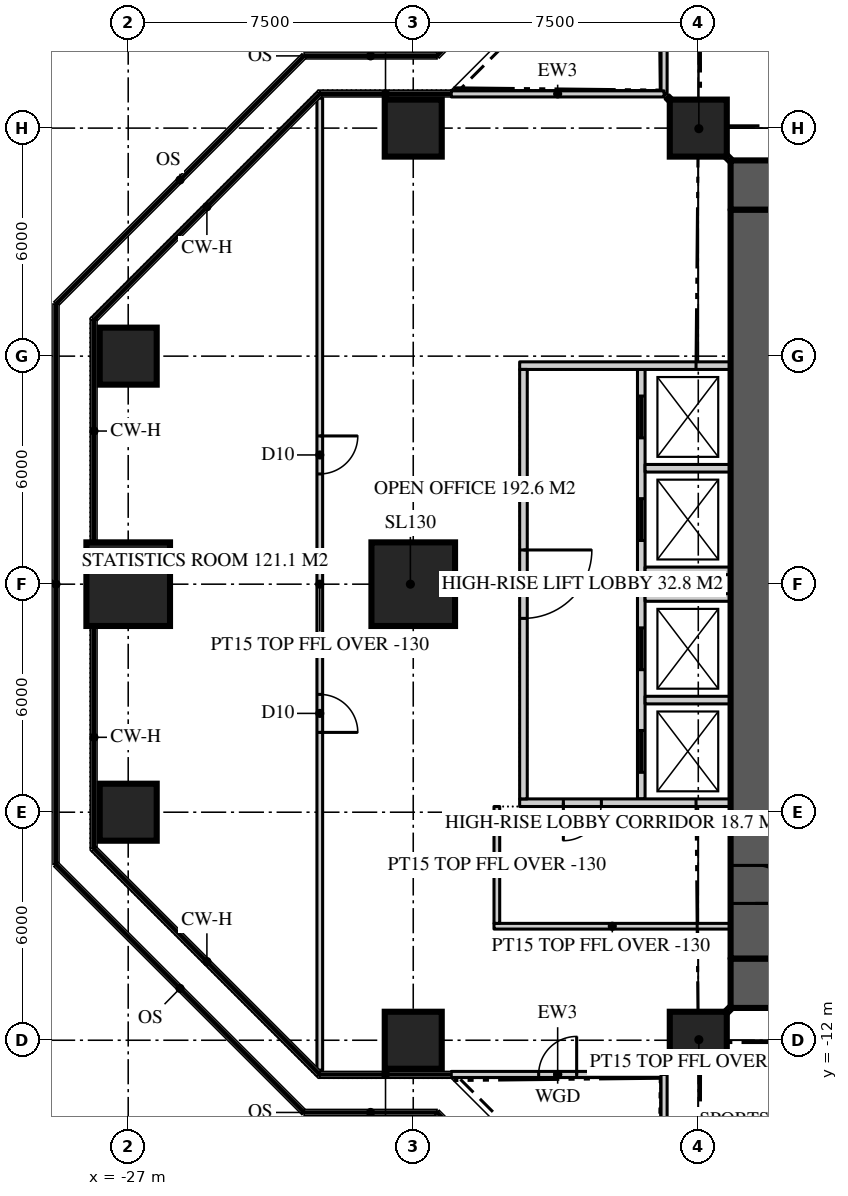
"""IFC4 building model, lengths in metres.
Left out: names, types, materials, properties, quantities, classifications, styles, units other than length and angle.
Written with IfcOpenShell. Run it as: python <this file> out.ifc"""

import sys

from ifc_helpers import new_model, si_unit, direction, frame, frame_2d, origin, origin_2d, place, context, subcontext, project, spatial, rectangle, extrude, element, fill, save


model = new_model("IFC4")
c1 = context("Model", 3, precision=1e-05, world=origin(), true_north=direction((0.0, 1.0)))
c2 = subcontext(c1, "Body", "Model", "MODEL_VIEW")
j1 = project(units=[si_unit("LENGTHUNIT", "METRE"), si_unit("PLANEANGLEUNIT", "RADIAN")], contexts=[c1])
p1 = place(None, origin())
s1 = spatial("IfcSite", under=j1, at=p1, CompositionType="ELEMENT")
p2 = place(p1, origin())
s2 = spatial("IfcBuilding", under=s1, at=p2, CompositionType="ELEMENT")
p3 = place(p2, frame((0.0, 0.0, 216.6)))
s3 = spatial("IfcBuildingStorey", under=s2, at=p3, CompositionType="ELEMENT", Elevation=216.6)
p4 = place(p3, frame((-11.15, 10.5, 0.0), z_axis=(0.0, 0.0, 1.0), x_axis=(1.0, 0.0, 0.0)))
e1 = element("IfcWall", 1, at=p4, inside=s3, PredefinedType="SHEAR", context=c2, shape_type="SweptSolid", body=[
    extrude(rectangle(XDim=22.3, YDim=1.3, at=frame_2d((11.15, 0.0))), origin(), (0.0, 0.0, 1.0), 3.9),
])
p5 = place(p4, frame((4.25, 0.0, 0.0)))
e2 = element("IfcOpeningElement", 2, at=p5, cuts=e1, PredefinedType="OPENING", context=c2, shape_type="SweptSolid", body=[
    extrude(rectangle(XDim=1.8, YDim=2.2, at=frame_2d((0.9, 1.1))), frame((0.0, 0.66, 0.0), z_axis=(0.0, -1.0, 0.0), x_axis=(1.0, 0.0, 0.0)), (0.0, 0.0, 1.0), 1.32),
])
p6 = place(p4, frame((16.25, 0.0, 0.0)))
e3 = element("IfcOpeningElement", 3, at=p6, cuts=e1, PredefinedType="OPENING", context=c2, shape_type="SweptSolid", body=[
    extrude(rectangle(XDim=1.8, YDim=2.2, at=frame_2d((0.9, 1.1))), frame((0.0, 0.66, 0.0), z_axis=(0.0, -1.0, 0.0), x_axis=(1.0, 0.0, 0.0)), (0.0, 0.0, 1.0), 1.32),
])
p7 = place(p3, frame((11.15, -10.5, 0.0), z_axis=(0.0, 0.0, 1.0), x_axis=(-1.0, 0.0, 0.0)))
e4 = element("IfcWall", 4, at=p7, inside=s3, PredefinedType="SHEAR", context=c2, shape_type="SweptSolid", body=[
    extrude(rectangle(XDim=22.3, YDim=1.3, at=frame_2d((11.15, 0.0))), origin(), (0.0, 0.0, 1.0), 3.9),
])
p8 = place(p7, frame((16.25, 0.0, 0.0)))
e5 = element("IfcOpeningElement", 5, at=p8, cuts=e4, PredefinedType="OPENING", context=c2, shape_type="SweptSolid", body=[
    extrude(rectangle(XDim=1.8, YDim=2.2, at=frame_2d((0.9, 1.1))), frame((0.0, 0.66, 0.0), z_axis=(0.0, -1.0, 0.0), x_axis=(1.0, 0.0, 0.0)), (0.0, 0.0, 1.0), 1.32),
])
p9 = place(p7, frame((4.25, 0.0, 0.0)))
e6 = element("IfcOpeningElement", 6, at=p9, cuts=e4, PredefinedType="OPENING", context=c2, shape_type="SweptSolid", body=[
    extrude(rectangle(XDim=1.8, YDim=2.2, at=frame_2d((0.9, 1.1))), frame((0.0, 0.66, 0.0), z_axis=(0.0, -1.0, 0.0), x_axis=(1.0, 0.0, 0.0)), (0.0, 0.0, 1.0), 1.32),
])
p10 = place(p3, frame((-10.5, 9.85, 0.0), z_axis=(0.0, 0.0, 1.0), x_axis=(0.0, -1.0, 0.0)))
e7 = element("IfcWall", 7, at=p10, inside=s3, PredefinedType="SHEAR", context=c2, shape_type="SweptSolid", body=[
    extrude(rectangle(XDim=19.7, YDim=1.3, at=frame_2d((9.85, 0.0))), origin(), (0.0, 0.0, 1.0), 3.9),
])
p11 = place(p10, frame((17.25, 0.0, 0.0)))
e8 = element("IfcOpeningElement", 8, at=p11, cuts=e7, PredefinedType="OPENING", context=c2, shape_type="SweptSolid", body=[
    extrude(rectangle(XDim=1.0, YDim=2.2, at=frame_2d((0.5, 1.1))), frame((0.0, 0.66, 0.0), z_axis=(0.0, -1.0, 0.0), x_axis=(1.0, 0.0, 0.0)), (0.0, 0.0, 1.0), 1.32),
])
for number, where, z_axis, x_axis in (
    (9, (-19.5, -12.0, 0.0), (0.0, 0.0, 1.0), (1.0, 0.0, 0.0)),
    (10, (-12.0, -12.0, 0.0), (0.0, 0.0, 1.0), (1.0, 0.0, 0.0)),
    (11, (-27.0, -6.0, 0.0), (0.0, 0.0, 1.0), (1.0, 0.0, 0.0)),
):
    element("IfcColumn", number, at=place(p3, frame(where, z_axis=z_axis, x_axis=x_axis)), inside=s3, PredefinedType="COLUMN", context=c2, shape_type="SweptSolid", body=[
        extrude(rectangle(XDim=1.5, YDim=1.5, at=origin_2d()), origin(), (0.0, 0.0, 1.0), 3.9),
    ])
for number, where, z_axis, x_axis in (
    (12, (-27.0, 0.0, 0.0), (0.0, 0.0, 1.0), (1.0, 0.0, 0.0)),
    (13, (-19.5, 0.0, 0.0), (0.0, 0.0, 1.0), (1.0, 0.0, 0.0)),
):
    element("IfcColumn", number, at=place(p3, frame(where, z_axis=z_axis, x_axis=x_axis)), inside=s3, PredefinedType="COLUMN", context=c2, shape_type="SweptSolid", body=[
        extrude(rectangle(XDim=2.2, YDim=2.2, at=origin_2d()), origin(), (0.0, 0.0, 1.0), 3.9),
    ])
for number, where, z_axis, x_axis in (
    (14, (-27.0, 6.0, 0.0), (0.0, 0.0, 1.0), (1.0, 0.0, 0.0)),
    (15, (-19.5, 12.0, 0.0), (0.0, 0.0, 1.0), (1.0, 0.0, 0.0)),
    (16, (-12.0, 12.0, 0.0), (0.0, 0.0, 1.0), (1.0, 0.0, 0.0)),
):
    element("IfcColumn", number, at=place(p3, frame(where, z_axis=z_axis, x_axis=x_axis)), inside=s3, PredefinedType="COLUMN", context=c2, shape_type="SweptSolid", body=[
        extrude(rectangle(XDim=1.5, YDim=1.5, at=origin_2d()), origin(), (0.0, 0.0, 1.0), 3.9),
    ])
p12 = place(p3, frame((-12.9, 18.5, 0.0), z_axis=(0.0, 0.0, 1.0), x_axis=(0.0, -1.0, 0.0)))
e17 = element("IfcWall", 17, at=p12, inside=s3, PredefinedType="SOLIDWALL", context=c2, shape_type="SweptSolid", body=[
    extrude(rectangle(XDim=5.6, YDim=0.16, at=frame_2d((2.8, 0.0))), origin(), (0.0, 0.0, 1.0), 3.77),
])
p13 = place(p12, frame((2.3, 0.0, 0.0)))
e18 = element("IfcOpeningElement", 18, at=p13, cuts=e17, PredefinedType="OPENING", context=c2, shape_type="SweptSolid", body=[
    extrude(rectangle(XDim=1.0, YDim=2.2, at=frame_2d((0.5, 1.1))), frame((0.0, 0.09, 0.0), z_axis=(0.0, -1.0, 0.0), x_axis=(1.0, 0.0, 0.0)), (0.0, 0.0, 1.0), 0.18),
])
p14 = place(p3, frame((-12.9, 12.9, 0.0), z_axis=(0.0, 0.0, 1.0), x_axis=(-1.0, 0.0, 0.0)))
e19 = element("IfcWall", 19, at=p14, inside=s3, PredefinedType="SOLIDWALL", context=c2, shape_type="SweptSolid", body=[
    extrude(rectangle(XDim=5.6, YDim=0.16, at=frame_2d((2.8, 0.0))), origin(), (0.0, 0.0, 1.0), 3.77),
])
p15 = place(p3, frame((-18.5, -12.9, 0.0), z_axis=(0.0, 0.0, 1.0), x_axis=(1.0, 0.0, 0.0)))
e20 = element("IfcWall", 20, at=p15, inside=s3, PredefinedType="SOLIDWALL", context=c2, shape_type="SweptSolid", body=[
    extrude(rectangle(XDim=5.6, YDim=0.16, at=frame_2d((2.8, 0.0))), origin(), (0.0, 0.0, 1.0), 3.77),
])
p16 = place(p15, frame((2.3, 0.0, 0.0)))
e21 = element("IfcOpeningElement", 21, at=p16, cuts=e20, PredefinedType="OPENING", context=c2, shape_type="SweptSolid", body=[
    extrude(rectangle(XDim=1.0, YDim=2.2, at=frame_2d((0.5, 1.1))), frame((0.0, 0.09, 0.0), z_axis=(0.0, -1.0, 0.0), x_axis=(1.0, 0.0, 0.0)), (0.0, 0.0, 1.0), 0.18),
])
p17 = place(p3, frame((-12.9, -12.9, 0.0), z_axis=(0.0, 0.0, 1.0), x_axis=(0.0, -1.0, 0.0)))
e22 = element("IfcWall", 22, at=p17, inside=s3, PredefinedType="SOLIDWALL", context=c2, shape_type="SweptSolid", body=[
    extrude(rectangle(XDim=5.6, YDim=0.16, at=frame_2d((2.8, 0.0))), origin(), (0.0, 0.0, 1.0), 3.77),
])
p18 = place(p3, frame((-21.959, 12.786, 0.0), z_axis=(0.0, 0.0, 1.0), x_axis=(0.0, -1.0, 0.0)))
e23 = element("IfcWall", 23, at=p18, inside=s3, PredefinedType="PARTITIONING", context=c2, shape_type="SweptSolid", body=[
    extrude(rectangle(XDim=25.573, YDim=0.15, at=frame_2d((12.786, 0.0))), origin(), (0.0, 0.0, 1.0), 3.77),
])
p19 = place(p18, frame((15.687, 0.0, 0.0)))
e24 = element("IfcOpeningElement", 24, at=p19, cuts=e23, PredefinedType="OPENING", context=c2, shape_type="SweptSolid", body=[
    extrude(rectangle(XDim=1.0, YDim=2.2, at=frame_2d((0.5, 1.1))), frame((0.0, 0.085, 0.0), z_axis=(0.0, -1.0, 0.0), x_axis=(1.0, 0.0, 0.0)), (0.0, 0.0, 1.0), 0.17),
])
p20 = place(p18, frame((8.886, 0.0, 0.0)))
e25 = element("IfcOpeningElement", 25, at=p20, cuts=e23, PredefinedType="OPENING", context=c2, shape_type="SweptSolid", body=[
    extrude(rectangle(XDim=1.0, YDim=2.2, at=frame_2d((0.5, 1.1))), frame((0.0, 0.085, 0.0), z_axis=(0.0, -1.0, 0.0), x_axis=(1.0, 0.0, 0.0)), (0.0, 0.0, 1.0), 0.17),
])
p21 = place(p3, frame((-13.5, 5.65, 0.0), z_axis=(0.0, 0.0, 1.0), x_axis=(0.0, -1.0, 0.0)))
e26 = element("IfcWall", 26, at=p21, inside=s3, PredefinedType="SOLIDWALL", context=c2, shape_type="SweptSolid", body=[
    extrude(rectangle(XDim=11.3, YDim=0.2, at=frame_2d((5.65, 0.0))), origin(), (0.0, 0.0, 1.0), 3.7),
])
p22 = place(p21, frame((0.7, 0.0, 0.0)))
e27 = element("IfcOpeningElement", 27, at=p22, cuts=e26, PredefinedType="OPENING", context=c2, shape_type="SweptSolid", body=[
    extrude(rectangle(XDim=1.1, YDim=2.2, at=frame_2d((0.55, 1.1))), frame((0.0, 0.11, 0.0), z_axis=(0.0, -1.0, 0.0), x_axis=(1.0, 0.0, 0.0)), (0.0, 0.0, 1.0), 0.22),
])
p23 = place(p21, frame((3.4, 0.0, 0.0)))
e28 = element("IfcOpeningElement", 28, at=p23, cuts=e26, PredefinedType="OPENING", context=c2, shape_type="SweptSolid", body=[
    extrude(rectangle(XDim=1.1, YDim=2.2, at=frame_2d((0.55, 1.1))), frame((0.0, 0.11, 0.0), z_axis=(0.0, -1.0, 0.0), x_axis=(1.0, 0.0, 0.0)), (0.0, 0.0, 1.0), 0.22),
])
p24 = place(p21, frame((6.8, 0.0, 0.0)))
e29 = element("IfcOpeningElement", 29, at=p24, cuts=e26, PredefinedType="OPENING", context=c2, shape_type="SweptSolid", body=[
    extrude(rectangle(XDim=1.1, YDim=2.2, at=frame_2d((0.55, 1.1))), frame((0.0, 0.11, 0.0), z_axis=(0.0, -1.0, 0.0), x_axis=(1.0, 0.0, 0.0)), (0.0, 0.0, 1.0), 0.22),
])
p25 = place(p21, frame((9.5, 0.0, 0.0)))
e30 = element("IfcOpeningElement", 30, at=p25, cuts=e26, PredefinedType="OPENING", context=c2, shape_type="SweptSolid", body=[
    extrude(rectangle(XDim=1.1, YDim=2.2, at=frame_2d((0.55, 1.1))), frame((0.0, 0.11, 0.0), z_axis=(0.0, -1.0, 0.0), x_axis=(1.0, 0.0, 0.0)), (0.0, 0.0, 1.0), 0.22),
])
p26 = place(p3, frame((-11.15, 5.75, 0.0), z_axis=(0.0, 0.0, 1.0), x_axis=(-1.0, 0.0, 0.0)))
e31 = element("IfcWall", 31, at=p26, inside=s3, PredefinedType="SOLIDWALL", context=c2, shape_type="SweptSolid", body=[
    extrude(rectangle(XDim=5.55, YDim=0.2, at=frame_2d((2.775, 0.0))), origin(), (0.0, 0.0, 1.0), 3.7),
])
p27 = place(p3, frame((-11.15, -5.75, 0.0), z_axis=(0.0, 0.0, 1.0), x_axis=(-1.0, 0.0, 0.0)))
e32 = element("IfcWall", 32, at=p27, inside=s3, PredefinedType="SOLIDWALL", context=c2, shape_type="SweptSolid", body=[
    extrude(rectangle(XDim=5.55, YDim=0.2, at=frame_2d((2.775, 0.0))), origin(), (0.0, 0.0, 1.0), 3.7),
])
p28 = place(p27, frame((3.4, 0.0, 0.0)))
e33 = element("IfcOpeningElement", 33, at=p28, cuts=e32, PredefinedType="OPENING", context=c2, shape_type="SweptSolid", body=[
    extrude(rectangle(XDim=1.0, YDim=2.2, at=frame_2d((0.5, 1.1))), frame((0.0, 0.11, 0.0), z_axis=(0.0, -1.0, 0.0), x_axis=(1.0, 0.0, 0.0)), (0.0, 0.0, 1.0), 0.22),
])
for number, where, z_axis, x_axis in (
    (34, (-11.15, 3.05, 0.0), (0.0, 0.0, 1.0), (-1.0, 0.0, 0.0)),
    (35, (-11.15, 0.35, 0.0), (0.0, 0.0, 1.0), (-1.0, 0.0, 0.0)),
    (36, (-11.15, -0.35, 0.0), (0.0, 0.0, 1.0), (-1.0, 0.0, 0.0)),
    (37, (-11.15, -3.05, 0.0), (0.0, 0.0, 1.0), (-1.0, 0.0, 0.0)),
):
    element("IfcWall", number, at=place(p3, frame(where, z_axis=z_axis, x_axis=x_axis)), inside=s3, PredefinedType="SOLIDWALL", context=c2, shape_type="SweptSolid", body=[
        extrude(rectangle(XDim=2.25, YDim=0.2, at=frame_2d((1.125, 0.0))), origin(), (0.0, 0.0, 1.0), 3.7),
    ])
p29 = place(p3, frame((-16.6, 5.65, 0.0), z_axis=(0.0, 0.0, 1.0), x_axis=(0.0, -1.0, 0.0)))
e38 = element("IfcWall", 38, at=p29, inside=s3, PredefinedType="SOLIDWALL", context=c2, shape_type="SweptSolid", body=[
    extrude(rectangle(XDim=11.3, YDim=0.2, at=frame_2d((5.65, 0.0))), origin(), (0.0, 0.0, 1.0), 3.18),
])
p30 = place(p29, frame((4.75, 0.0, 0.0)))
e39 = element("IfcOpeningElement", 39, at=p30, cuts=e38, PredefinedType="OPENING", context=c2, shape_type="SweptSolid", body=[
    extrude(rectangle(XDim=1.8, YDim=2.2, at=frame_2d((0.9, 1.1))), frame((0.0, 0.11, 0.0), z_axis=(0.0, -1.0, 0.0), x_axis=(1.0, 0.0, 0.0)), (0.0, 0.0, 1.0), 0.22),
])
for number, where, z_axis, x_axis in (
    (40, (-11.15, 11.15, 0.0), (0.0, 0.0, 1.0), (-0.707, 0.707, 0.0)),
    (41, (-11.15, -11.15, 0.0), (0.0, 0.0, 1.0), (-0.707, -0.707, 0.0)),
):
    element("IfcWall", number, at=place(p3, frame(where, z_axis=z_axis, x_axis=x_axis)), inside=s3, PredefinedType="PARTITIONING", context=c2, shape_type="SweptSolid", body=[
        extrude(rectangle(XDim=2.362, YDim=0.15, at=frame_2d((1.181, 0.0))), origin(), (0.0, 0.0, 1.0), 3.22),
    ])
p31 = place(p3, frame((-11.15, -9.0, 0.0), z_axis=(0.0, 0.0, 1.0), x_axis=(-1.0, 0.0, 0.0)))
e42 = element("IfcWall", 42, at=p31, inside=s3, PredefinedType="PARTITIONING", context=c2, shape_type="SweptSolid", body=[
    extrude(rectangle(XDim=6.225, YDim=0.15, at=frame_2d((3.113, 0.0))), origin(), (0.0, 0.0, 1.0), 3.77),
])
p32 = place(p3, frame((-17.3, -5.85, 0.0), z_axis=(0.0, 0.0, 1.0), x_axis=(0.0, -1.0, 0.0)))
e43 = element("IfcWall", 43, at=p32, inside=s3, PredefinedType="PARTITIONING", context=c2, shape_type="SweptSolid", body=[
    extrude(rectangle(XDim=3.075, YDim=0.15, at=frame_2d((1.538, 0.0))), origin(), (0.0, 0.0, 1.0), 3.77),
])
p33 = place(p16, origin())
e44 = element("IfcDoor", 44, at=p33, inside=s3, OperationType="SINGLE_SWING_RIGHT", PredefinedType="DOOR", context=c2, shape_type="SweptSolid", body=[
    extrude(rectangle(XDim=1.0, YDim=2.2, at=frame_2d((0.5, 1.1))), frame((0.0, 0.025, 0.0), z_axis=(0.0, -1.0, 0.0), x_axis=(1.0, 0.0, 0.0)), (0.0, 0.0, 1.0), 0.05),
])
fill(e21, e44)
p34 = place(p11, origin())
e45 = element("IfcDoor", 45, at=p34, inside=s3, OperationType="SINGLE_SWING_RIGHT", PredefinedType="DOOR", context=c2, shape_type="SweptSolid", body=[
    extrude(rectangle(XDim=1.0, YDim=2.2, at=frame_2d((0.5, 1.1))), frame((0.0, 0.025, 0.0), z_axis=(0.0, -1.0, 0.0), x_axis=(1.0, 0.0, 0.0)), (0.0, 0.0, 1.0), 0.05),
])
fill(e8, e45)
p35 = place(p19, origin())
e46 = element("IfcDoor", 46, at=p35, inside=s3, OperationType="SINGLE_SWING_RIGHT", PredefinedType="DOOR", context=c2, shape_type="SweptSolid", body=[
    extrude(rectangle(XDim=1.0, YDim=2.2, at=frame_2d((0.5, 1.1))), frame((0.0, 0.025, 0.0), z_axis=(0.0, -1.0, 0.0), x_axis=(1.0, 0.0, 0.0)), (0.0, 0.0, 1.0), 0.05),
])
fill(e24, e46)
p36 = place(p20, origin())
e47 = element("IfcDoor", 47, at=p36, inside=s3, OperationType="SINGLE_SWING_LEFT", PredefinedType="DOOR", context=c2, shape_type="SweptSolid", body=[
    extrude(rectangle(XDim=1.0, YDim=2.2, at=frame_2d((0.5, 1.1))), frame((0.0, 0.025, 0.0), z_axis=(0.0, -1.0, 0.0), x_axis=(1.0, 0.0, 0.0)), (0.0, 0.0, 1.0), 0.05),
])
fill(e25, e47)
p37 = place(p30, origin())
e48 = element("IfcDoor", 48, at=p37, inside=s3, OperationType="DOUBLE_DOOR_DOUBLE_SWING", PredefinedType="DOOR", context=c2, shape_type="SweptSolid", body=[
    extrude(rectangle(XDim=1.8, YDim=2.2, at=frame_2d((0.9, 1.1))), frame((0.0, 0.025, 0.0), z_axis=(0.0, -1.0, 0.0), x_axis=(1.0, 0.0, 0.0)), (0.0, 0.0, 1.0), 0.05),
])
fill(e39, e48)
p38 = place(p22, origin())
e49 = element("IfcDoor", 49, at=p38, inside=s3, OperationType="SLIDING_TO_LEFT", PredefinedType="DOOR", context=c2, shape_type="SweptSolid", body=[
    extrude(rectangle(XDim=1.1, YDim=2.2, at=frame_2d((0.55, 1.1))), frame((0.0, 0.025, 0.0), z_axis=(0.0, -1.0, 0.0), x_axis=(1.0, 0.0, 0.0)), (0.0, 0.0, 1.0), 0.05),
])
fill(e27, e49)
p39 = place(p23, origin())
e50 = element("IfcDoor", 50, at=p39, inside=s3, OperationType="SLIDING_TO_LEFT", PredefinedType="DOOR", context=c2, shape_type="SweptSolid", body=[
    extrude(rectangle(XDim=1.1, YDim=2.2, at=frame_2d((0.55, 1.1))), frame((0.0, 0.025, 0.0), z_axis=(0.0, -1.0, 0.0), x_axis=(1.0, 0.0, 0.0)), (0.0, 0.0, 1.0), 0.05),
])
fill(e28, e50)
p40 = place(p24, origin())
e51 = element("IfcDoor", 51, at=p40, inside=s3, OperationType="SLIDING_TO_LEFT", PredefinedType="DOOR", context=c2, shape_type="SweptSolid", body=[
    extrude(rectangle(XDim=1.1, YDim=2.2, at=frame_2d((0.55, 1.1))), frame((0.0, 0.025, 0.0), z_axis=(0.0, -1.0, 0.0), x_axis=(1.0, 0.0, 0.0)), (0.0, 0.0, 1.0), 0.05),
])
fill(e29, e51)
p41 = place(p25, origin())
e52 = element("IfcDoor", 52, at=p41, inside=s3, OperationType="SLIDING_TO_LEFT", PredefinedType="DOOR", context=c2, shape_type="SweptSolid", body=[
    extrude(rectangle(XDim=1.1, YDim=2.2, at=frame_2d((0.55, 1.1))), frame((0.0, 0.025, 0.0), z_axis=(0.0, -1.0, 0.0), x_axis=(1.0, 0.0, 0.0)), (0.0, 0.0, 1.0), 0.05),
])
fill(e30, e52)
p42 = place(p28, origin())
e53 = element("IfcDoor", 53, at=p42, inside=s3, OperationType="SINGLE_SWING_RIGHT", PredefinedType="DOOR", context=c2, shape_type="SweptSolid", body=[
    extrude(rectangle(XDim=1.0, YDim=2.2, at=frame_2d((0.5, 1.1))), frame((0.0, 0.025, 0.0), z_axis=(0.0, -1.0, 0.0), x_axis=(1.0, 0.0, 0.0)), (0.0, 0.0, 1.0), 0.05),
])
fill(e33, e53)
save(model, sys.argv[1])
